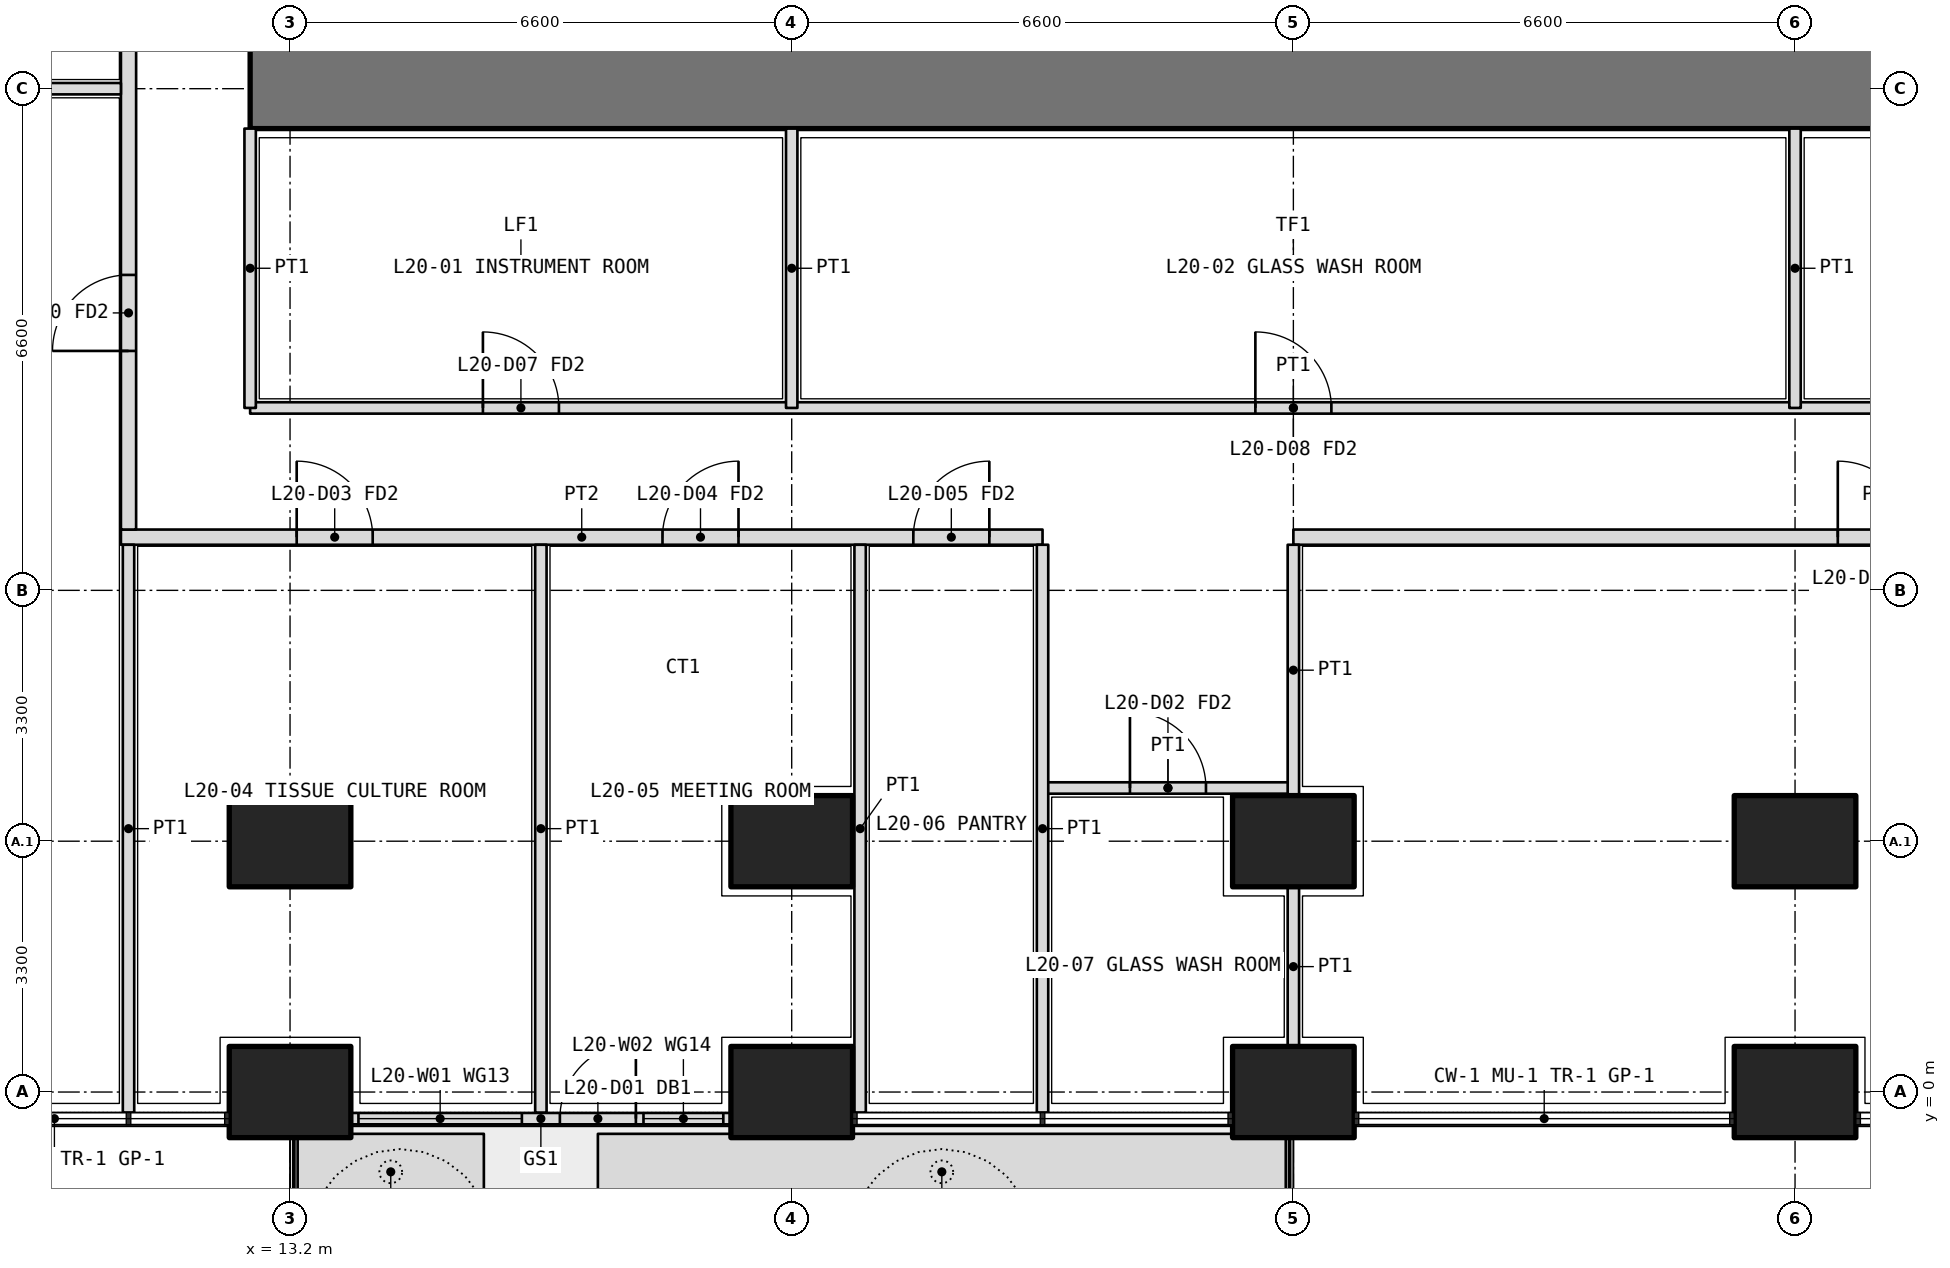
"""IFC4 building model, lengths in metres.
Left out: names, types, materials, properties, quantities, classifications, styles, units other than length and angle.
Written with IfcOpenShell. Run it as: python <this file> out.ifc"""

import sys

from ifc_helpers import new_model, si_unit, direction, frame, frame_2d, origin, origin_2d, place, context, subcontext, project, spatial, polyline, rectangle, outline, extrude, element, fill, save


model = new_model("IFC4")
c1 = context("Model", 3, precision=1e-05, world=origin(), true_north=direction((0.0, 1.0)))
c2 = subcontext(c1, "Body", "Model", "MODEL_VIEW")
j1 = project(units=[si_unit("LENGTHUNIT", "METRE"), si_unit("PLANEANGLEUNIT", "RADIAN")], contexts=[c1])
p1 = place(None, origin())
s1 = spatial("IfcSite", under=j1, at=p1, CompositionType="ELEMENT")
p2 = place(p1, origin())
s2 = spatial("IfcBuilding", under=s1, at=p2, CompositionType="ELEMENT")
p3 = place(p2, frame((0.0, 0.0, 90.6)))
s3 = spatial("IfcBuildingStorey", under=s2, at=p3, CompositionType="ELEMENT", Elevation=90.6)
for number, where, z_axis, x_axis in (
    (1, (13.2, 0.0, 0.0), (0.0, 0.0, 1.0), (1.0, 0.0, 0.0)),
    (2, (19.8, 0.0, 0.0), (0.0, 0.0, 1.0), (1.0, 0.0, 0.0)),
    (3, (26.4, 0.0, 0.0), (0.0, 0.0, 1.0), (1.0, 0.0, 0.0)),
    (4, (33.0, 0.0, 0.0), (0.0, 0.0, 1.0), (1.0, 0.0, 0.0)),
    (5, (13.2, 3.3, 0.0), (0.0, 0.0, 1.0), (1.0, 0.0, 0.0)),
    (6, (19.8, 3.3, 0.0), (0.0, 0.0, 1.0), (1.0, 0.0, 0.0)),
    (7, (26.4, 3.3, 0.0), (0.0, 0.0, 1.0), (1.0, 0.0, 0.0)),
    (8, (33.0, 3.3, 0.0), (0.0, 0.0, 1.0), (1.0, 0.0, 0.0)),
):
    element("IfcColumn", number, at=place(p3, frame(where, z_axis=z_axis, x_axis=x_axis)), inside=s3, PredefinedType="COLUMN", context=c2, shape_type="SweptSolid", body=[
        extrude(rectangle(XDim=1.6, YDim=1.2, at=origin_2d()), origin(), (0.0, 0.0, 1.0), 4.2),
    ])
p4 = place(p3, origin())
e9 = element("IfcWall", 9, at=p4, inside=s3, PredefinedType="USERDEFINED", context=c2, shape_type="SweptSolid", body=[
    extrude(outline(polyline([(13.3, -1.55), (15.75, -1.55), (15.75, -0.55), (13.3, -0.55), (13.3, -1.55)]), holes=[polyline([(13.45, -1.4), (15.6, -1.4), (15.6, -0.7), (13.45, -0.7), (13.45, -1.4)])]), origin(), (0.0, 0.0, 1.0), 1.05),
])
p5 = place(p3, origin())
e10 = element("IfcWall", 10, at=p5, inside=s3, PredefinedType="USERDEFINED", context=c2, shape_type="SweptSolid", body=[
    extrude(outline(polyline([(17.25, -1.55), (26.3, -1.55), (26.3, -0.55), (17.25, -0.55), (17.25, -1.55)]), holes=[polyline([(17.4, -1.4), (26.15, -1.4), (26.15, -0.7), (17.4, -0.7), (17.4, -1.4)])]), origin(), (0.0, 0.0, 1.0), 1.05),
])
p6 = place(p3, frame((14.0, -0.35, 0.0), z_axis=(0.0, 0.0, 1.0), x_axis=(1.0, 0.0, 0.0)))
e11 = element("IfcWall", 11, at=p6, inside=s3, PredefinedType="SOLIDWALL", context=c2, shape_type="SweptSolid", body=[
    extrude(rectangle(XDim=5.0, YDim=0.15, at=frame_2d((2.5, 0.0))), origin(), (0.0, 0.0, 1.0), 2.7),
])
p7 = place(p6, frame((2.75, 0.0, 0.0)))
e12 = element("IfcOpeningElement", 12, at=p7, cuts=e11, PredefinedType="OPENING", context=c2, shape_type="SweptSolid", body=[
    extrude(rectangle(XDim=1.0, YDim=2.4, at=frame_2d((0.5, 1.2))), frame((0.0, 0.085, 0.0), z_axis=(0.0, -1.0, 0.0), x_axis=(1.0, 0.0, 0.0)), (0.0, 0.0, 1.0), 0.17),
])
p8 = place(p6, frame((0.1, 0.0, 0.1)))
e13 = element("IfcOpeningElement", 13, at=p8, cuts=e11, PredefinedType="OPENING", context=c2, shape_type="SweptSolid", body=[
    extrude(rectangle(XDim=2.15, YDim=2.3, at=frame_2d((1.075, 1.15))), frame((0.0, 0.085, 0.0), z_axis=(0.0, -1.0, 0.0), x_axis=(1.0, 0.0, 0.0)), (0.0, 0.0, 1.0), 0.17),
])
p9 = place(p6, frame((3.85, 0.0, 0.1)))
e14 = element("IfcOpeningElement", 14, at=p9, cuts=e11, PredefinedType="OPENING", context=c2, shape_type="SweptSolid", body=[
    extrude(rectangle(XDim=1.05, YDim=2.3, at=frame_2d((0.525, 1.15))), frame((0.0, 0.085, 0.0), z_axis=(0.0, -1.0, 0.0), x_axis=(1.0, 0.0, 0.0)), (0.0, 0.0, 1.0), 0.17),
])
p10 = place(p3, frame((12.675, 13.2, 0.0), z_axis=(0.0, 0.0, 1.0), x_axis=(1.0, 0.0, 0.0)))
e15 = element("IfcWall", 15, at=p10, inside=s3, PredefinedType="SHEAR", context=c2, shape_type="SweptSolid", body=[
    extrude(rectangle(XDim=27.45, YDim=1.05, at=frame_2d((13.725, 0.0))), origin(), (0.0, 0.0, 1.0), 4.2),
])
p11 = place(p3, frame((12.675, 9.0, 0.0), z_axis=(0.0, 0.0, 1.0), x_axis=(1.0, 0.0, 0.0)))
e16 = element("IfcWall", 16, at=p11, inside=s3, PredefinedType="PARTITIONING", context=c2, shape_type="SweptSolid", body=[
    extrude(rectangle(XDim=27.45, YDim=0.15, at=frame_2d((13.725, 0.0))), origin(), (0.0, 0.0, 1.0), 2.85),
])
p12 = place(p11, frame((3.062, 0.0, 0.0)))
e17 = element("IfcOpeningElement", 17, at=p12, cuts=e16, PredefinedType="OPENING", context=c2, shape_type="SweptSolid", body=[
    extrude(rectangle(XDim=1.0, YDim=2.1, at=frame_2d((0.5, 1.05))), frame((0.0, 0.085, 0.0), z_axis=(0.0, -1.0, 0.0), x_axis=(1.0, 0.0, 0.0)), (0.0, 0.0, 1.0), 0.17),
])
p13 = place(p11, frame((13.225, 0.0, 0.0)))
e18 = element("IfcOpeningElement", 18, at=p13, cuts=e16, PredefinedType="OPENING", context=c2, shape_type="SweptSolid", body=[
    extrude(rectangle(XDim=1.0, YDim=2.1, at=frame_2d((0.5, 1.05))), frame((0.0, 0.085, 0.0), z_axis=(0.0, -1.0, 0.0), x_axis=(1.0, 0.0, 0.0)), (0.0, 0.0, 1.0), 0.17),
])
p14 = place(p11, frame((23.387, 0.0, 0.0)))
e19 = element("IfcOpeningElement", 19, at=p14, cuts=e16, PredefinedType="OPENING", context=c2, shape_type="SweptSolid", body=[
    extrude(rectangle(XDim=1.0, YDim=2.1, at=frame_2d((0.5, 1.05))), frame((0.0, 0.085, 0.0), z_axis=(0.0, -1.0, 0.0), x_axis=(1.0, 0.0, 0.0)), (0.0, 0.0, 1.0), 0.17),
])
for number, where, z_axis, x_axis in (
    (20, (12.675, 12.675, 0.0), (0.0, 0.0, 1.0), (0.0, -1.0, 0.0)),
    (21, (19.8, 12.675, 0.0), (0.0, 0.0, 1.0), (0.0, -1.0, 0.0)),
    (22, (33.0, 12.675, 0.0), (0.0, 0.0, 1.0), (0.0, -1.0, 0.0)),
):
    element("IfcWall", number, at=place(p3, frame(where, z_axis=z_axis, x_axis=x_axis)), inside=s3, PredefinedType="PARTITIONING", context=c2, shape_type="SweptSolid", body=[
        extrude(rectangle(XDim=3.675, YDim=0.15, at=frame_2d((1.837, 0.0))), origin(), (0.0, 0.0, 1.0), 2.85),
    ])
p15 = place(p3, frame((10.975, 7.3, 0.0), z_axis=(0.0, 0.0, 1.0), x_axis=(1.0, 0.0, 0.0)))
e23 = element("IfcWall", 23, at=p15, inside=s3, PredefinedType="PARTITIONING", context=c2, shape_type="SweptSolid", body=[
    extrude(rectangle(XDim=12.125, YDim=0.2, at=frame_2d((6.062, 0.0))), origin(), (0.0, 0.0, 1.0), 2.85),
])
p16 = place(p15, frame((2.312, 0.0, 0.0)))
e24 = element("IfcOpeningElement", 24, at=p16, cuts=e23, PredefinedType="OPENING", context=c2, shape_type="SweptSolid", body=[
    extrude(rectangle(XDim=1.0, YDim=2.1, at=frame_2d((0.5, 1.05))), frame((0.0, 0.11, 0.0), z_axis=(0.0, -1.0, 0.0), x_axis=(1.0, 0.0, 0.0)), (0.0, 0.0, 1.0), 0.22),
])
p17 = place(p15, frame((7.125, 0.0, 0.0)))
e25 = element("IfcOpeningElement", 25, at=p17, cuts=e23, PredefinedType="OPENING", context=c2, shape_type="SweptSolid", body=[
    extrude(rectangle(XDim=1.0, YDim=2.1, at=frame_2d((0.5, 1.05))), frame((0.0, 0.11, 0.0), z_axis=(0.0, -1.0, 0.0), x_axis=(1.0, 0.0, 0.0)), (0.0, 0.0, 1.0), 0.22),
])
p18 = place(p15, frame((10.425, 0.0, 0.0)))
e26 = element("IfcOpeningElement", 26, at=p18, cuts=e23, PredefinedType="OPENING", context=c2, shape_type="SweptSolid", body=[
    extrude(rectangle(XDim=1.0, YDim=2.1, at=frame_2d((0.5, 1.05))), frame((0.0, 0.11, 0.0), z_axis=(0.0, -1.0, 0.0), x_axis=(1.0, 0.0, 0.0)), (0.0, 0.0, 1.0), 0.22),
])
p19 = place(p3, frame((26.4, 7.3, 0.0), z_axis=(0.0, 0.0, 1.0), x_axis=(1.0, 0.0, 0.0)))
e27 = element("IfcWall", 27, at=p19, inside=s3, PredefinedType="PARTITIONING", context=c2, shape_type="SweptSolid", body=[
    extrude(rectangle(XDim=15.425, YDim=0.2, at=frame_2d((7.712, 0.0))), origin(), (0.0, 0.0, 1.0), 2.85),
])
p20 = place(p19, frame((7.163, 0.0, 0.0)))
e28 = element("IfcOpeningElement", 28, at=p20, cuts=e27, PredefinedType="OPENING", context=c2, shape_type="SweptSolid", body=[
    extrude(rectangle(XDim=1.0, YDim=2.1, at=frame_2d((0.5, 1.05))), frame((0.0, 0.11, 0.0), z_axis=(0.0, -1.0, 0.0), x_axis=(1.0, 0.0, 0.0)), (0.0, 0.0, 1.0), 0.22),
])
p21 = place(p3, frame((11.075, 7.4, 0.0), z_axis=(0.0, 0.0, 1.0), x_axis=(0.0, 1.0, 0.0)))
e29 = element("IfcWall", 29, at=p21, inside=s3, PredefinedType="PARTITIONING", context=c2, shape_type="SweptSolid", body=[
    extrude(rectangle(XDim=27.625, YDim=0.2, at=frame_2d((13.812, 0.0))), origin(), (0.0, 0.0, 1.0), 2.85),
])
p22 = place(p21, frame((2.35, 0.0, 0.0)))
e30 = element("IfcOpeningElement", 30, at=p22, cuts=e29, PredefinedType="OPENING", context=c2, shape_type="SweptSolid", body=[
    extrude(rectangle(XDim=1.0, YDim=2.1, at=frame_2d((0.5, 1.05))), frame((0.0, 0.11, 0.0), z_axis=(0.0, -1.0, 0.0), x_axis=(1.0, 0.0, 0.0)), (0.0, 0.0, 1.0), 0.22),
])
p23 = place(p21, frame((6.35, 0.0, 0.0)))
e31 = element("IfcOpeningElement", 31, at=p23, cuts=e29, PredefinedType="OPENING", context=c2, shape_type="SweptSolid", body=[
    extrude(rectangle(XDim=1.0, YDim=2.1, at=frame_2d((0.5, 1.05))), frame((0.0, 0.11, 0.0), z_axis=(0.0, -1.0, 0.0), x_axis=(1.0, 0.0, 0.0)), (0.0, 0.0, 1.0), 0.22),
])
p24 = place(p21, frame((9.4, 0.0, 0.0)))
e32 = element("IfcOpeningElement", 32, at=p24, cuts=e29, PredefinedType="OPENING", context=c2, shape_type="SweptSolid", body=[
    extrude(rectangle(XDim=0.9, YDim=2.1, at=frame_2d((0.45, 1.05))), frame((0.0, 0.11, 0.0), z_axis=(0.0, -1.0, 0.0), x_axis=(1.0, 0.0, 0.0)), (0.0, 0.0, 1.0), 0.22),
])
p25 = place(p21, frame((13.2, 0.0, 0.0)))
e33 = element("IfcOpeningElement", 33, at=p25, cuts=e29, PredefinedType="OPENING", context=c2, shape_type="SweptSolid", body=[
    extrude(rectangle(XDim=0.9, YDim=2.1, at=frame_2d((0.45, 1.05))), frame((0.0, 0.11, 0.0), z_axis=(0.0, -1.0, 0.0), x_axis=(1.0, 0.0, 0.0)), (0.0, 0.0, 1.0), 0.22),
])
p26 = place(p21, frame((16.75, 0.0, 0.0)))
e34 = element("IfcOpeningElement", 34, at=p26, cuts=e29, PredefinedType="OPENING", context=c2, shape_type="SweptSolid", body=[
    extrude(rectangle(XDim=1.0, YDim=2.1, at=frame_2d((0.5, 1.05))), frame((0.0, 0.11, 0.0), z_axis=(0.0, -1.0, 0.0), x_axis=(1.0, 0.0, 0.0)), (0.0, 0.0, 1.0), 0.22),
])
p27 = place(p21, frame((20.15, 0.0, 0.0)))
e35 = element("IfcOpeningElement", 35, at=p27, cuts=e29, PredefinedType="OPENING", context=c2, shape_type="SweptSolid", body=[
    extrude(rectangle(XDim=1.0, YDim=2.1, at=frame_2d((0.5, 1.05))), frame((0.0, 0.11, 0.0), z_axis=(0.0, -1.0, 0.0), x_axis=(1.0, 0.0, 0.0)), (0.0, 0.0, 1.0), 0.22),
])
p28 = place(p21, frame((23.45, 0.0, 0.0)))
e36 = element("IfcOpeningElement", 36, at=p28, cuts=e29, PredefinedType="OPENING", context=c2, shape_type="SweptSolid", body=[
    extrude(rectangle(XDim=1.0, YDim=2.1, at=frame_2d((0.5, 1.05))), frame((0.0, 0.11, 0.0), z_axis=(0.0, -1.0, 0.0), x_axis=(1.0, 0.0, 0.0)), (0.0, 0.0, 1.0), 0.22),
])
p29 = place(p21, frame((26.163, 0.0, 0.0)))
e37 = element("IfcOpeningElement", 37, at=p29, cuts=e29, PredefinedType="OPENING", context=c2, shape_type="SweptSolid", body=[
    extrude(rectangle(XDim=1.0, YDim=2.1, at=frame_2d((0.5, 1.05))), frame((0.0, 0.11, 0.0), z_axis=(0.0, -1.0, 0.0), x_axis=(1.0, 0.0, 0.0)), (0.0, 0.0, 1.0), 0.22),
])
for number, where, z_axis, x_axis in (
    (38, (11.075, -0.27, 0.0), (0.0, 0.0, 1.0), (0.0, 1.0, 0.0)),
    (39, (20.7, -0.27, 0.0), (0.0, 0.0, 1.0), (0.0, 1.0, 0.0)),
):
    element("IfcWall", number, at=place(p3, frame(where, z_axis=z_axis, x_axis=x_axis)), inside=s3, PredefinedType="PARTITIONING", context=c2, shape_type="SweptSolid", body=[
        extrude(rectangle(XDim=7.47, YDim=0.15, at=frame_2d((3.735, 0.0))), origin(), (0.0, 0.0, 1.0), 2.7),
    ])
p30 = place(p3, frame((23.1, 4.0, 0.0), z_axis=(0.0, 0.0, 1.0), x_axis=(1.0, 0.0, 0.0)))
e40 = element("IfcWall", 40, at=p30, inside=s3, PredefinedType="PARTITIONING", context=c2, shape_type="SweptSolid", body=[
    extrude(rectangle(XDim=3.3, YDim=0.15, at=frame_2d((1.65, 0.0))), origin(), (0.0, 0.0, 1.0), 2.85),
])
p31 = place(p30, frame((1.15, 0.0, 0.0)))
e41 = element("IfcOpeningElement", 41, at=p31, cuts=e40, PredefinedType="OPENING", context=c2, shape_type="SweptSolid", body=[
    extrude(rectangle(XDim=1.0, YDim=2.1, at=frame_2d((0.5, 1.05))), frame((0.0, 0.085, 0.0), z_axis=(0.0, -1.0, 0.0), x_axis=(1.0, 0.0, 0.0)), (0.0, 0.0, 1.0), 0.17),
])
for number, where, z_axis, x_axis in (
    (42, (16.5, -0.27, 0.0), (0.0, 0.0, 1.0), (0.0, 1.0, 0.0)),
    (43, (23.1, -0.27, 0.0), (0.0, 0.0, 1.0), (0.0, 1.0, 0.0)),
):
    element("IfcWall", number, at=place(p3, frame(where, z_axis=z_axis, x_axis=x_axis)), inside=s3, PredefinedType="PARTITIONING", context=c2, shape_type="SweptSolid", body=[
        extrude(rectangle(XDim=7.47, YDim=0.15, at=frame_2d((3.735, 0.0))), origin(), (0.0, 0.0, 1.0), 2.7),
    ])
p32 = place(p3, frame((26.4, 0.6, 0.0), z_axis=(0.0, 0.0, 1.0), x_axis=(0.0, 1.0, 0.0)))
e44 = element("IfcWall", 44, at=p32, inside=s3, PredefinedType="PARTITIONING", context=c2, shape_type="SweptSolid", body=[
    extrude(rectangle(XDim=2.1, YDim=0.15, at=frame_2d((1.05, 0.0))), origin(), (0.0, 0.0, 1.0), 2.85),
])
p33 = place(p3, frame((26.4, 3.9, 0.0), z_axis=(0.0, 0.0, 1.0), x_axis=(0.0, 1.0, 0.0)))
e45 = element("IfcWall", 45, at=p33, inside=s3, PredefinedType="PARTITIONING", context=c2, shape_type="SweptSolid", body=[
    extrude(rectangle(XDim=3.3, YDim=0.15, at=frame_2d((1.65, 0.0))), origin(), (0.0, 0.0, 1.0), 2.85),
])
p34 = place(p3, frame((7.2, 13.2, 0.0), z_axis=(0.0, 0.0, 1.0), x_axis=(1.0, 0.0, 0.0)))
e46 = element("IfcWall", 46, at=p34, inside=s3, PredefinedType="PARTITIONING", context=c2, shape_type="SweptSolid", body=[
    extrude(rectangle(XDim=3.775, YDim=0.15, at=frame_2d((1.888, 0.0))), origin(), (0.0, 0.0, 1.0), 2.85),
])
p35 = place(p7, origin())
e47 = element("IfcDoor", 47, at=p35, inside=s3, OperationType="SINGLE_SWING_RIGHT", PredefinedType="DOOR", context=c2, shape_type="SweptSolid", body=[
    extrude(rectangle(XDim=1.0, YDim=2.4, at=frame_2d((0.5, 1.2))), frame((0.0, 0.025, 0.0), z_axis=(0.0, -1.0, 0.0), x_axis=(1.0, 0.0, 0.0)), (0.0, 0.0, 1.0), 0.05),
])
fill(e12, e47)
p36 = place(p8, origin())
e48 = element("IfcWindow", 48, at=p36, inside=s3, PartitioningType="SINGLE_PANEL", PredefinedType="WINDOW", context=c2, shape_type="SweptSolid", body=[
    extrude(rectangle(XDim=2.15, YDim=2.3, at=frame_2d((1.075, 1.15))), frame((0.0, 0.03, 0.0), z_axis=(0.0, -1.0, 0.0), x_axis=(1.0, 0.0, 0.0)), (0.0, 0.0, 1.0), 0.06),
])
fill(e13, e48)
p37 = place(p9, origin())
e49 = element("IfcWindow", 49, at=p37, inside=s3, PartitioningType="SINGLE_PANEL", PredefinedType="WINDOW", context=c2, shape_type="SweptSolid", body=[
    extrude(rectangle(XDim=1.05, YDim=2.3, at=frame_2d((0.525, 1.15))), frame((0.0, 0.03, 0.0), z_axis=(0.0, -1.0, 0.0), x_axis=(1.0, 0.0, 0.0)), (0.0, 0.0, 1.0), 0.06),
])
fill(e14, e49)
p38 = place(p12, origin())
e50 = element("IfcDoor", 50, at=p38, inside=s3, OperationType="SINGLE_SWING_LEFT", PredefinedType="DOOR", context=c2, shape_type="SweptSolid", body=[
    extrude(rectangle(XDim=1.0, YDim=2.1, at=frame_2d((0.5, 1.05))), frame((0.0, 0.025, 0.0), z_axis=(0.0, -1.0, 0.0), x_axis=(1.0, 0.0, 0.0)), (0.0, 0.0, 1.0), 0.05),
])
fill(e17, e50)
p39 = place(p13, origin())
e51 = element("IfcDoor", 51, at=p39, inside=s3, OperationType="SINGLE_SWING_LEFT", PredefinedType="DOOR", context=c2, shape_type="SweptSolid", body=[
    extrude(rectangle(XDim=1.0, YDim=2.1, at=frame_2d((0.5, 1.05))), frame((0.0, 0.025, 0.0), z_axis=(0.0, -1.0, 0.0), x_axis=(1.0, 0.0, 0.0)), (0.0, 0.0, 1.0), 0.05),
])
fill(e18, e51)
p40 = place(p16, origin())
e52 = element("IfcDoor", 52, at=p40, inside=s3, OperationType="SINGLE_SWING_LEFT", PredefinedType="DOOR", context=c2, shape_type="SweptSolid", body=[
    extrude(rectangle(XDim=1.0, YDim=2.1, at=frame_2d((0.5, 1.05))), frame((0.0, 0.025, 0.0), z_axis=(0.0, -1.0, 0.0), x_axis=(1.0, 0.0, 0.0)), (0.0, 0.0, 1.0), 0.05),
])
fill(e24, e52)
p41 = place(p17, origin())
e53 = element("IfcDoor", 53, at=p41, inside=s3, OperationType="SINGLE_SWING_RIGHT", PredefinedType="DOOR", context=c2, shape_type="SweptSolid", body=[
    extrude(rectangle(XDim=1.0, YDim=2.1, at=frame_2d((0.5, 1.05))), frame((0.0, 0.025, 0.0), z_axis=(0.0, -1.0, 0.0), x_axis=(1.0, 0.0, 0.0)), (0.0, 0.0, 1.0), 0.05),
])
fill(e25, e53)
p42 = place(p18, origin())
e54 = element("IfcDoor", 54, at=p42, inside=s3, OperationType="SINGLE_SWING_RIGHT", PredefinedType="DOOR", context=c2, shape_type="SweptSolid", body=[
    extrude(rectangle(XDim=1.0, YDim=2.1, at=frame_2d((0.5, 1.05))), frame((0.0, 0.025, 0.0), z_axis=(0.0, -1.0, 0.0), x_axis=(1.0, 0.0, 0.0)), (0.0, 0.0, 1.0), 0.05),
])
fill(e26, e54)
p43 = place(p31, origin())
e55 = element("IfcDoor", 55, at=p43, inside=s3, OperationType="SINGLE_SWING_LEFT", PredefinedType="DOOR", context=c2, shape_type="SweptSolid", body=[
    extrude(rectangle(XDim=1.0, YDim=2.1, at=frame_2d((0.5, 1.05))), frame((0.0, 0.025, 0.0), z_axis=(0.0, -1.0, 0.0), x_axis=(1.0, 0.0, 0.0)), (0.0, 0.0, 1.0), 0.05),
])
fill(e41, e55)
p44 = place(p20, origin())
e56 = element("IfcDoor", 56, at=p44, inside=s3, OperationType="SINGLE_SWING_LEFT", PredefinedType="DOOR", context=c2, shape_type="SweptSolid", body=[
    extrude(rectangle(XDim=1.0, YDim=2.1, at=frame_2d((0.5, 1.05))), frame((0.0, 0.025, 0.0), z_axis=(0.0, -1.0, 0.0), x_axis=(1.0, 0.0, 0.0)), (0.0, 0.0, 1.0), 0.05),
])
fill(e28, e56)
p45 = place(p22, origin())
e57 = element("IfcDoor", 57, at=p45, inside=s3, OperationType="SINGLE_SWING_LEFT", PredefinedType="DOOR", context=c2, shape_type="SweptSolid", body=[
    extrude(rectangle(XDim=1.0, YDim=2.1, at=frame_2d((0.5, 1.05))), frame((0.0, 0.025, 0.0), z_axis=(0.0, -1.0, 0.0), x_axis=(1.0, 0.0, 0.0)), (0.0, 0.0, 1.0), 0.05),
])
fill(e30, e57)
save(model, sys.argv[1])
